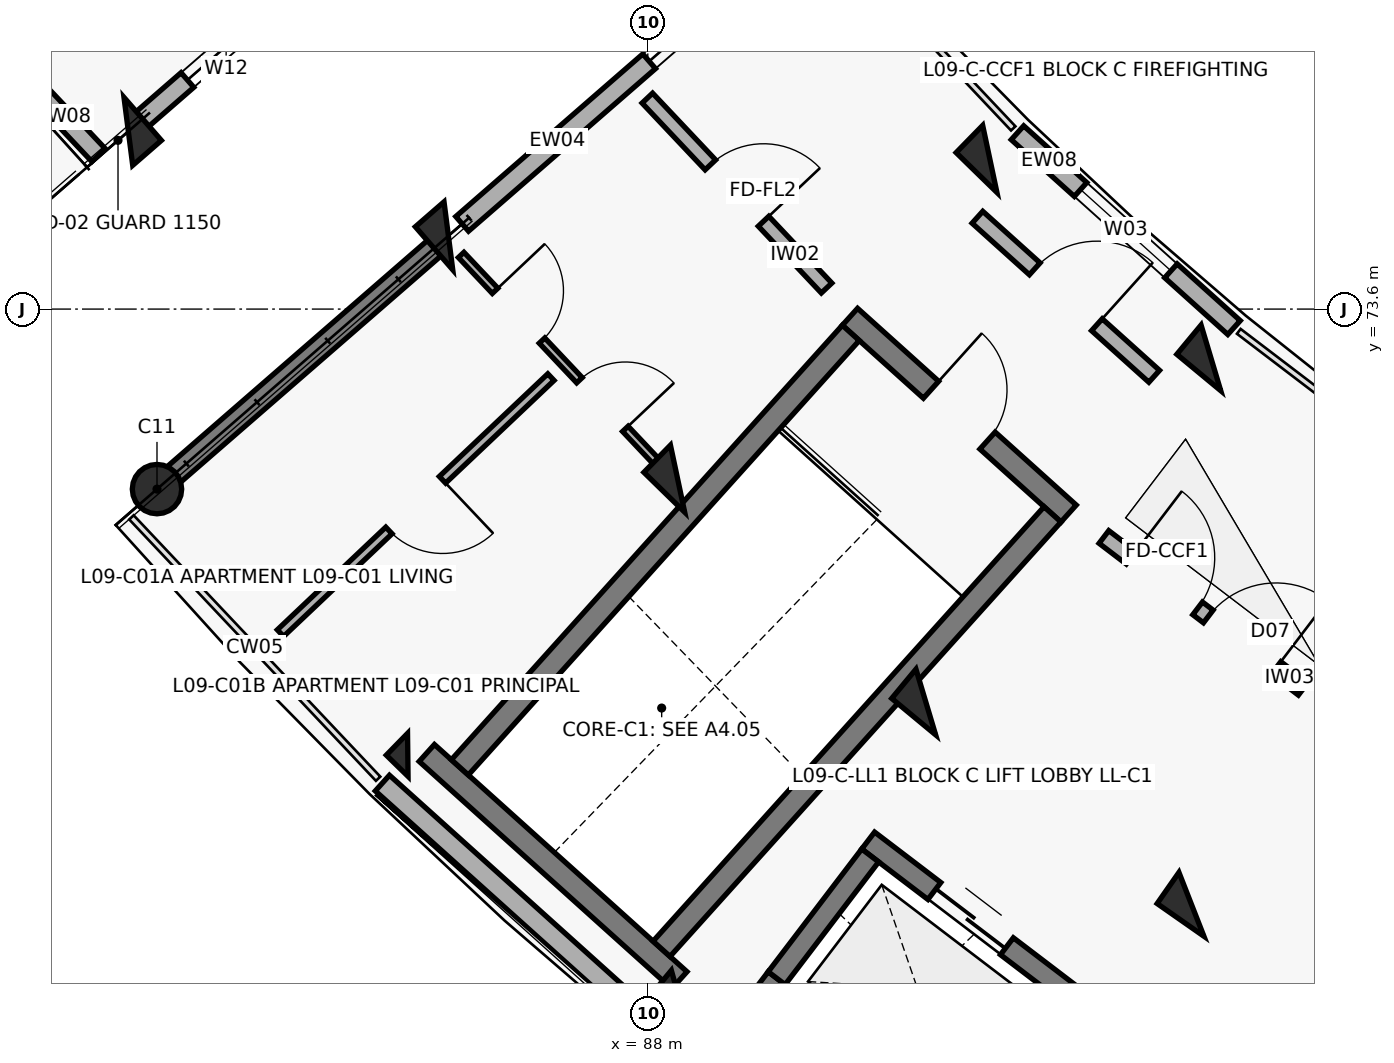
"""IFC4 building model, lengths in metres.
Left out: names, types, materials, properties, quantities, classifications, styles, units other than length and angle.
Written with IfcOpenShell. Run it as: python <this file> out.ifc"""

import sys

from ifc_helpers import new_model, si_unit, direction, frame, frame_2d, origin, origin_2d, place, context, subcontext, project, spatial, rectangle, circle, extrude, element, fill, save


model = new_model("IFC4")
c1 = context("Model", 3, precision=1e-05, world=origin(), true_north=direction((0.0, 1.0)))
c2 = subcontext(c1, "Body", "Model", "MODEL_VIEW")
j1 = project(units=[si_unit("LENGTHUNIT", "METRE"), si_unit("PLANEANGLEUNIT", "RADIAN")], contexts=[c1])
p1 = place(None, origin())
s1 = spatial("IfcSite", under=j1, at=p1, CompositionType="ELEMENT")
p2 = place(p1, origin())
s2 = spatial("IfcBuilding", under=s1, at=p2, CompositionType="ELEMENT")
p3 = place(p2, frame((0.0, 0.0, 29.8)))
s3 = spatial("IfcBuildingStorey", under=s2, at=p3, CompositionType="ELEMENT", Elevation=29.8)
for number, where, z_axis, x_axis in (
    (1, (81.166, 75.938, 0.0), (0.0, 0.0, 1.0), (0.755, 0.656, 0.0)),
    (2, (85.377, 74.564, 0.0), (0.0, 0.0, 1.0), (-0.755, -0.656, 0.0)),
):
    element("IfcColumn", number, at=place(p3, frame(where, z_axis=z_axis, x_axis=x_axis)), inside=s3, PredefinedType="COLUMN", context=c2, shape_type="SweptSolid", body=[
        extrude(rectangle(XDim=0.5, YDim=0.75, at=origin_2d()), origin(), (0.0, 0.0, 1.0), 3.1),
    ])
p4 = place(p3, frame((81.543, 71.231, 0.0), z_axis=(0.0, 0.0, 1.0), x_axis=(-0.754709580223, -0.656059028991, 0.0)))
e3 = element("IfcColumn", 3, at=p4, inside=s3, PredefinedType="COLUMN", context=c2, shape_type="SweptSolid", body=[
    extrude(circle(Radius=0.325, at=origin_2d()), origin(), (0.0, 0.0, 1.0), 3.1),
])
for number, where, z_axis, x_axis in (
    (4, (92.5, 75.576, 0.0), (0.0, 0.0, 1.0), (-0.699, -0.715, 0.0)),
    (5, (88.392, 71.369, 0.0), (0.0, 0.0, 1.0), (-0.699, -0.715, 0.0)),
):
    element("IfcColumn", number, at=place(p3, frame(where, z_axis=z_axis, x_axis=x_axis)), inside=s3, PredefinedType="COLUMN", context=c2, shape_type="SweptSolid", body=[
        extrude(rectangle(XDim=0.5, YDim=0.75, at=origin_2d()), origin(), (0.0, 0.0, 1.0), 3.1),
    ])
p5 = place(p3, frame((84.843, 67.734, 0.0), z_axis=(0.0, 0.0, 1.0), x_axis=(-0.698665066769, -0.715448897181, 0.0)))
e6 = element("IfcColumn", 6, at=p5, inside=s3, PredefinedType="COLUMN", context=c2, shape_type="SweptSolid", body=[
    extrude(rectangle(XDim=0.4, YDim=0.4, at=origin_2d()), origin(), (0.0, 0.0, 1.0), 3.1),
])
for number, where, z_axis, x_axis in (
    (7, (95.409, 72.958, 0.0), (0.0, 0.0, 1.0), (-0.638, -0.77, 0.0)),
    (8, (91.658, 68.43, 0.0), (0.0, 0.0, 1.0), (-0.638, -0.77, 0.0)),
):
    element("IfcColumn", number, at=place(p3, frame(where, z_axis=z_axis, x_axis=x_axis)), inside=s3, PredefinedType="COLUMN", context=c2, shape_type="SweptSolid", body=[
        extrude(rectangle(XDim=0.5, YDim=0.75, at=origin_2d()), origin(), (0.0, 0.0, 1.0), 3.1),
    ])
p6 = place(p3, frame((88.417, 64.518, 0.0), z_axis=(0.0, 0.0, 1.0), x_axis=(-0.637961754089, -0.770068049148, 0.0)))
e9 = element("IfcColumn", 9, at=p6, inside=s3, PredefinedType="COLUMN", context=c2, shape_type="SweptSolid", body=[
    extrude(rectangle(XDim=0.45, YDim=0.65, at=origin_2d()), origin(), (0.0, 0.0, 1.0), 3.1),
])
p7 = place(p3, frame((95.152, 65.768, 0.0), z_axis=(0.0, 0.0, 1.0), x_axis=(-0.573004420611, -0.819552276527, 0.0)))
e10 = element("IfcColumn", 10, at=p7, inside=s3, PredefinedType="COLUMN", context=c2, shape_type="SweptSolid", body=[
    extrude(rectangle(XDim=0.5, YDim=0.75, at=origin_2d()), origin(), (0.0, 0.0, 1.0), 3.1),
])
p8 = place(p3, frame((85.241, 74.446, 0.0), z_axis=(0.0, 0.0, 1.0), x_axis=(-0.754703505217, -0.65606601742, 0.0)))
e11 = element("IfcWall", 11, at=p8, inside=s3, PredefinedType="SHEAR", context=c2, shape_type="SweptSolid", body=[
    extrude(rectangle(XDim=4.72, YDim=0.27, at=frame_2d((2.36, 0.0))), origin(), (0.0, 0.0, 1.0), 2.92),
])
p9 = place(p3, frame((78.145, 78.412, 0.0), z_axis=(0.0, 0.0, 1.0), x_axis=(0.686296103853, -0.727322251712, 0.0)))
e12 = element("IfcWall", 12, at=p9, inside=s3, PredefinedType="SOLIDWALL", context=c2, shape_type="SweptSolid", body=[
    extrude(rectangle(XDim=3.832, YDim=0.245, at=frame_2d((1.916, 0.0))), origin(), (0.0, 0.0, 1.0), 2.25),
])
p10 = place(p9, frame((1.366, 0.0, 0.0)))
e13 = element("IfcOpeningElement", 13, at=p10, cuts=e12, PredefinedType="OPENING", context=c2, shape_type="SweptSolid", body=[
    extrude(rectangle(XDim=1.1, YDim=2.15, at=frame_2d((0.55, 1.075))), frame((0.0, 0.133, 0.0), z_axis=(0.0, -1.0, 0.0), x_axis=(1.0, 0.0, 0.0)), (0.0, 0.0, 1.0), 0.265),
])
p11 = place(p3, frame((81.347, 76.096, 0.0), z_axis=(0.0, 0.0, 1.0), x_axis=(0.754709658894, 0.65605893849, 0.0)))
e14 = element("IfcWall", 14, at=p11, inside=s3, PredefinedType="SOLIDWALL", context=c2, shape_type="SweptSolid", body=[
    extrude(rectangle(XDim=5.4, YDim=0.255, at=frame_2d((2.7, 0.0))), origin(), (0.0, 0.0, 1.0), 2.18),
])
p12 = place(p11, frame((0.79, 0.0, 0.75)))
e15 = element("IfcOpeningElement", 15, at=p12, cuts=e14, PredefinedType="OPENING", context=c2, shape_type="SweptSolid", body=[
    extrude(rectangle(XDim=1.35, YDim=1.35, at=frame_2d((0.675, 0.675))), frame((0.0, 0.137, 0.0), z_axis=(0.0, -1.0, 0.0), x_axis=(1.0, 0.0, 0.0)), (0.0, 0.0, 1.0), 0.275),
])
p13 = place(p3, frame((84.508, 67.363, 0.0), z_axis=(0.0, 0.0, 1.0), x_axis=(0.743387539862, -0.668860946369, 0.0)))
e16 = element("IfcWall", 16, at=p13, inside=s3, PredefinedType="SOLIDWALL", context=c2, shape_type="SweptSolid", body=[
    extrude(rectangle(XDim=4.809, YDim=0.278, at=frame_2d((2.405, 0.0))), origin(), (0.0, 0.0, 1.0), 2.25),
])
p14 = place(p3, frame((92.864, 75.92, 0.0), z_axis=(0.0, 0.0, 1.0), x_axis=(0.743363835609, -0.668887290886, 0.0)))
e17 = element("IfcWall", 17, at=p14, inside=s3, PredefinedType="SOLIDWALL", context=c2, shape_type="SweptSolid", body=[
    extrude(rectangle(XDim=3.832, YDim=0.245, at=frame_2d((1.916, 0.0))), origin(), (0.0, 0.0, 1.0), 2.25),
])
p15 = place(p14, frame((1.116, 0.0, 0.32)))
e18 = element("IfcOpeningElement", 18, at=p15, cuts=e17, PredefinedType="OPENING", context=c2, shape_type="SweptSolid", body=[
    extrude(rectangle(XDim=1.6, YDim=1.5, at=frame_2d((0.8, 0.75))), frame((0.0, 0.133, 0.0), z_axis=(0.0, -1.0, 0.0), x_axis=(1.0, 0.0, 0.0)), (0.0, 0.0, 1.0), 0.265),
])
p16 = place(p3, frame((89.633, 78.264, 0.0), z_axis=(0.0, 0.0, 1.0), x_axis=(-0.754709658894, -0.65605893849, 0.0)))
e19 = element("IfcWall", 19, at=p16, inside=s3, PredefinedType="SOLIDWALL", context=c2, shape_type="SweptSolid", body=[
    extrude(rectangle(XDim=5.4, YDim=0.255, at=frame_2d((2.7, 0.0))), origin(), (0.0, 0.0, 1.0), 2.24),
])
p17 = place(p16, frame((0.79, 0.0, 0.75)))
e20 = element("IfcOpeningElement", 20, at=p17, cuts=e19, PredefinedType="OPENING", context=c2, shape_type="SweptSolid", body=[
    extrude(rectangle(XDim=1.35, YDim=1.35, at=frame_2d((0.675, 0.675))), frame((0.0, 0.137, 0.0), z_axis=(0.0, -1.0, 0.0), x_axis=(1.0, 0.0, 0.0)), (0.0, 0.0, 1.0), 0.275),
])
p18 = place(p3, frame((90.66, 73.499, 0.0), z_axis=(0.0, 0.0, 1.0), x_axis=(0.743375696158, -0.668874109501, 0.0)))
e21 = element("IfcWall", 21, at=p18, inside=s3, PredefinedType="SHEAR", context=c2, shape_type="SweptSolid", body=[
    extrude(rectangle(XDim=3.87, YDim=0.3, at=frame_2d((1.935, 0.0))), origin(), (0.0, 0.0, 1.0), 3.1),
])
p19 = place(p18, frame((1.435, 0.0, 0.0)))
e22 = element("IfcOpeningElement", 22, at=p19, cuts=e21, PredefinedType="OPENING", context=c2, shape_type="SweptSolid", body=[
    extrude(rectangle(XDim=1.0, YDim=2.15, at=frame_2d((0.5, 1.075))), frame((0.0, 0.16, 0.0), z_axis=(0.0, -1.0, 0.0), x_axis=(1.0, 0.0, 0.0)), (0.0, 0.0, 1.0), 0.32),
])
p20 = place(p3, frame((85.093, 67.76, 0.0), z_axis=(0.0, 0.0, 1.0), x_axis=(0.743372896184, -0.668877221333, 0.0)))
e23 = element("IfcWall", 23, at=p20, inside=s3, PredefinedType="SHEAR", context=c2, shape_type="SweptSolid", body=[
    extrude(rectangle(XDim=4.47, YDim=0.3, at=frame_2d((2.235, 0.0))), origin(), (0.0, 0.0, 1.0), 3.1),
])
p21 = place(p3, frame((90.671, 73.287, 0.0), z_axis=(0.0, 0.0, 1.0), x_axis=(-0.668885797871, -0.743365179038, 0.0)))
e24 = element("IfcWall", 24, at=p21, inside=s3, PredefinedType="SHEAR", context=c2, shape_type="SweptSolid", body=[
    extrude(rectangle(XDim=7.69, YDim=0.3, at=frame_2d((3.845, 0.0))), origin(), (0.0, 0.0, 1.0), 3.1),
])
p22 = place(p3, frame((93.325, 70.899, 0.0), z_axis=(0.0, 0.0, 1.0), x_axis=(-0.668868253964, -0.743380964808, 0.0)))
e25 = element("IfcWall", 25, at=p22, inside=s3, PredefinedType="SHEAR", context=c2, shape_type="SweptSolid", body=[
    extrude(rectangle(XDim=7.69, YDim=0.3, at=frame_2d((3.845, 0.0))), origin(), (0.0, 0.0, 1.0), 3.1),
])
p23 = place(p3, frame((90.899, 66.607, 0.0), z_axis=(0.0, 0.0, 1.0), x_axis=(0.795439986025, -0.606032365994, 0.0)))
e26 = element("IfcWall", 26, at=p23, inside=s3, PredefinedType="SHEAR", context=c2, shape_type="SweptSolid", body=[
    extrude(rectangle(XDim=3.39, YDim=0.28, at=frame_2d((1.695, 0.0))), origin(), (0.0, 0.0, 1.0), 3.1),
])
p24 = place(p23, frame((1.095, 0.0, 0.0)))
e27 = element("IfcOpeningElement", 27, at=p24, cuts=e26, PredefinedType="OPENING", context=c2, shape_type="SweptSolid", body=[
    extrude(rectangle(XDim=1.2, YDim=2.15, at=frame_2d((0.6, 1.075))), frame((0.0, 0.15, 0.0), z_axis=(0.0, -1.0, 0.0), x_axis=(1.0, 0.0, 0.0)), (0.0, 0.0, 1.0), 0.3),
])
p25 = place(p3, frame((89.5, 64.77, 0.0), z_axis=(0.0, 0.0, 1.0), x_axis=(0.795474703455, -0.605986795371, 0.0)))
e28 = element("IfcWall", 28, at=p25, inside=s3, PredefinedType="SHEAR", context=c2, shape_type="SweptSolid", body=[
    extrude(rectangle(XDim=3.39, YDim=0.28, at=frame_2d((1.695, 0.0))), origin(), (0.0, 0.0, 1.0), 3.1),
])
p26 = place(p3, frame((90.926, 66.411, 0.0), z_axis=(0.0, 0.0, 1.0), x_axis=(-0.605948992168, -0.795503500238, 0.0)))
e29 = element("IfcWall", 29, at=p26, inside=s3, PredefinedType="SHEAR", context=c2, shape_type="SweptSolid", body=[
    extrude(rectangle(XDim=2.03, YDim=0.28, at=frame_2d((1.015, 0.0))), origin(), (0.0, 0.0, 1.0), 3.1),
])
p27 = place(p3, frame((87.994, 76.376, 0.0), z_axis=(0.0, 0.0, 1.0), x_axis=(0.686310507227, -0.727308660522, 0.0)))
e30 = element("IfcWall", 30, at=p27, inside=s3, PredefinedType="SOLIDWALL", context=c2, shape_type="SweptSolid", body=[
    extrude(rectangle(XDim=3.436, YDim=0.19, at=frame_2d((1.718, 0.0))), origin(), (0.0, 0.0, 1.0), 2.14),
])
p28 = place(p27, frame((1.208, 0.0, 0.0)))
e31 = element("IfcOpeningElement", 31, at=p28, cuts=e30, PredefinedType="OPENING", context=c2, shape_type="SweptSolid", body=[
    extrude(rectangle(XDim=1.02, YDim=2.15, at=frame_2d((0.51, 1.075))), frame((0.0, 0.105, 0.0), z_axis=(0.0, -1.0, 0.0), x_axis=(1.0, 0.0, 0.0)), (0.0, 0.0, 1.0), 0.21),
])
p29 = place(p3, frame((85.545, 74.313, 0.0), z_axis=(0.0, 0.0, 1.0), x_axis=(0.686332741542, -0.727287678906, 0.0)))
e32 = element("IfcWall", 32, at=p29, inside=s3, PredefinedType="PARTITIONING", context=c2, shape_type="SweptSolid", body=[
    extrude(rectangle(XDim=3.797, YDim=0.1, at=frame_2d((1.899, 0.0))), origin(), (0.0, 0.0, 1.0), 2.14),
])
p30 = place(p29, frame((0.65, 0.0, 0.0)))
e33 = element("IfcOpeningElement", 33, at=p30, cuts=e32, PredefinedType="OPENING", context=c2, shape_type="SweptSolid", body=[
    extrude(rectangle(XDim=0.9, YDim=2.1, at=frame_2d((0.45, 1.05))), frame((0.0, 0.06, 0.0), z_axis=(0.0, -1.0, 0.0), x_axis=(1.0, 0.0, 0.0)), (0.0, 0.0, 1.0), 0.12),
])
p31 = place(p29, frame((2.267, 0.0, 0.0)))
e34 = element("IfcOpeningElement", 34, at=p31, cuts=e32, PredefinedType="OPENING", context=c2, shape_type="SweptSolid", body=[
    extrude(rectangle(XDim=0.88, YDim=2.1, at=frame_2d((0.44, 1.05))), frame((0.0, 0.06, 0.0), z_axis=(0.0, -1.0, 0.0), x_axis=(1.0, 0.0, 0.0)), (0.0, 0.0, 1.0), 0.12),
])
p32 = place(p3, frame((86.726, 72.705, 0.0), z_axis=(0.0, 0.0, 1.0), x_axis=(-0.726270746475, -0.687408759629, 0.0)))
e35 = element("IfcWall", 35, at=p32, inside=s3, PredefinedType="PARTITIONING", context=c2, shape_type="SweptSolid", body=[
    extrude(rectangle(XDim=4.9, YDim=0.12, at=frame_2d((2.45, 0.0))), origin(), (0.0, 0.0, 1.0), 2.14),
])
p33 = place(p32, frame((1.965, 0.0, 0.0)))
e36 = element("IfcOpeningElement", 36, at=p33, cuts=e35, PredefinedType="OPENING", context=c2, shape_type="SweptSolid", body=[
    extrude(rectangle(XDim=0.97, YDim=2.1, at=frame_2d((0.485, 1.05))), frame((0.0, 0.07, 0.0), z_axis=(0.0, -1.0, 0.0), x_axis=(1.0, 0.0, 0.0)), (0.0, 0.0, 1.0), 0.14),
])
p34 = place(p3, frame((92.337, 74.808, 0.0), z_axis=(0.0, 0.0, 1.0), x_axis=(0.743348465558, -0.668904371904, 0.0)))
e37 = element("IfcWall", 37, at=p34, inside=s3, PredefinedType="SOLIDWALL", context=c2, shape_type="SweptSolid", body=[
    extrude(rectangle(XDim=3.129, YDim=0.21, at=frame_2d((1.564, 0.0))), origin(), (0.0, 0.0, 1.0), 2.14),
])
p35 = place(p34, frame((1.014, 0.0, 0.0)))
e38 = element("IfcOpeningElement", 38, at=p35, cuts=e37, PredefinedType="OPENING", context=c2, shape_type="SweptSolid", body=[
    extrude(rectangle(XDim=1.1, YDim=2.15, at=frame_2d((0.55, 1.075))), frame((0.0, 0.115, 0.0), z_axis=(0.0, -1.0, 0.0), x_axis=(1.0, 0.0, 0.0)), (0.0, 0.0, 1.0), 0.23),
])
p36 = place(p3, frame((94.001, 70.602, 0.0), z_axis=(0.0, 0.0, 1.0), x_axis=(0.795498026433, -0.605956178235, 0.0)))
e39 = element("IfcWall", 39, at=p36, inside=s3, PredefinedType="SOLIDWALL", context=c2, shape_type="SweptSolid", body=[
    extrude(rectangle(XDim=3.296, YDim=0.21, at=frame_2d((1.648, 0.0))), origin(), (0.0, 0.0, 1.0), 2.14),
])
p37 = place(p36, frame((0.45, 0.0, 0.0)))
e40 = element("IfcOpeningElement", 40, at=p37, cuts=e39, PredefinedType="OPENING", context=c2, shape_type="SweptSolid", body=[
    extrude(rectangle(XDim=1.1, YDim=2.15, at=frame_2d((0.55, 1.075))), frame((0.0, 0.115, 0.0), z_axis=(0.0, -1.0, 0.0), x_axis=(1.0, 0.0, 0.0)), (0.0, 0.0, 1.0), 0.23),
])
p38 = place(p36, frame((1.726, 0.0, 0.0)))
e41 = element("IfcOpeningElement", 41, at=p38, cuts=e39, PredefinedType="OPENING", context=c2, shape_type="SweptSolid", body=[
    extrude(rectangle(XDim=1.12, YDim=2.15, at=frame_2d((0.56, 1.075))), frame((0.0, 0.115, 0.0), z_axis=(0.0, -1.0, 0.0), x_axis=(1.0, 0.0, 0.0)), (0.0, 0.0, 1.0), 0.23),
])
p39 = place(p3, frame((98.504, 67.072, 0.0), z_axis=(0.0, 0.0, 1.0), x_axis=(-0.540338452216, -0.841447774408, 0.0)))
e42 = element("IfcWall", 42, at=p39, inside=s3, PredefinedType="PARTITIONING", context=c2, shape_type="SweptSolid", body=[
    extrude(rectangle(XDim=7.95, YDim=0.14, at=frame_2d((3.975, 0.0))), origin(), (0.0, 0.0, 1.0), 2.14),
])
p40 = place(p39, frame((6.05, 0.0, 0.0)))
e43 = element("IfcOpeningElement", 43, at=p40, cuts=e42, PredefinedType="OPENING", context=c2, shape_type="SweptSolid", body=[
    extrude(rectangle(XDim=0.92, YDim=2.1, at=frame_2d((0.46, 1.05))), frame((0.0, 0.08, 0.0), z_axis=(0.0, -1.0, 0.0), x_axis=(1.0, 0.0, 0.0)), (0.0, 0.0, 1.0), 0.16),
])
p41 = place(p12, origin())
e44 = element("IfcWindow", 44, at=p41, inside=s3, PartitioningType="DOUBLE_PANEL_VERTICAL", PredefinedType="WINDOW", context=c2, shape_type="SweptSolid", body=[
    extrude(rectangle(XDim=1.35, YDim=1.35, at=frame_2d((0.675, 0.675))), frame((0.0, 0.03, 0.0), z_axis=(0.0, -1.0, 0.0), x_axis=(1.0, 0.0, 0.0)), (0.0, 0.0, 1.0), 0.06),
])
fill(e15, e44)
p42 = place(p15, origin())
e45 = element("IfcWindow", 45, at=p42, inside=s3, PartitioningType="DOUBLE_PANEL_VERTICAL", PredefinedType="WINDOW", context=c2, shape_type="SweptSolid", body=[
    extrude(rectangle(XDim=1.6, YDim=1.5, at=frame_2d((0.8, 0.75))), frame((0.0, 0.03, 0.0), z_axis=(0.0, -1.0, 0.0), x_axis=(1.0, 0.0, 0.0)), (0.0, 0.0, 1.0), 0.06),
])
fill(e18, e45)
p43 = place(p17, origin())
e46 = element("IfcWindow", 46, at=p43, inside=s3, PartitioningType="DOUBLE_PANEL_VERTICAL", PredefinedType="WINDOW", context=c2, shape_type="SweptSolid", body=[
    extrude(rectangle(XDim=1.35, YDim=1.35, at=frame_2d((0.675, 0.675))), frame((0.0, 0.03, 0.0), z_axis=(0.0, -1.0, 0.0), x_axis=(1.0, 0.0, 0.0)), (0.0, 0.0, 1.0), 0.06),
])
fill(e20, e46)
p44 = place(p19, origin())
e47 = element("IfcDoor", 47, at=p44, inside=s3, OperationType="SINGLE_SWING_LEFT", PredefinedType="DOOR", context=c2, shape_type="SweptSolid", body=[
    extrude(rectangle(XDim=1.0, YDim=2.15, at=frame_2d((0.5, 1.075))), frame((0.0, 0.025, 0.0), z_axis=(0.0, -1.0, 0.0), x_axis=(1.0, 0.0, 0.0)), (0.0, 0.0, 1.0), 0.05),
])
fill(e22, e47)
p45 = place(p24, origin())
e48 = element("IfcDoor", 48, at=p45, inside=s3, OperationType="DOUBLE_DOOR_SLIDING", PredefinedType="DOOR", context=c2, shape_type="SweptSolid", body=[
    extrude(rectangle(XDim=1.2, YDim=2.15, at=frame_2d((0.6, 1.075))), frame((0.0, 0.025, 0.0), z_axis=(0.0, -1.0, 0.0), x_axis=(1.0, 0.0, 0.0)), (0.0, 0.0, 1.0), 0.05),
])
fill(e27, e48)
p46 = place(p28, origin())
e49 = element("IfcDoor", 49, at=p46, inside=s3, OperationType="SINGLE_SWING_RIGHT", PredefinedType="DOOR", context=c2, shape_type="SweptSolid", body=[
    extrude(rectangle(XDim=1.02, YDim=2.15, at=frame_2d((0.51, 1.075))), frame((0.0, 0.025, 0.0), z_axis=(0.0, -1.0, 0.0), x_axis=(1.0, 0.0, 0.0)), (0.0, 0.0, 1.0), 0.05),
])
fill(e31, e49)
p47 = place(p30, origin())
e50 = element("IfcDoor", 50, at=p47, inside=s3, OperationType="SINGLE_SWING_LEFT", PredefinedType="DOOR", context=c2, shape_type="SweptSolid", body=[
    extrude(rectangle(XDim=0.9, YDim=2.1, at=frame_2d((0.45, 1.05))), frame((0.0, 0.025, 0.0), z_axis=(0.0, -1.0, 0.0), x_axis=(1.0, 0.0, 0.0)), (0.0, 0.0, 1.0), 0.05),
])
fill(e33, e50)
p48 = place(p31, origin())
e51 = element("IfcDoor", 51, at=p48, inside=s3, OperationType="SINGLE_SWING_RIGHT", PredefinedType="DOOR", context=c2, shape_type="SweptSolid", body=[
    extrude(rectangle(XDim=0.88, YDim=2.1, at=frame_2d((0.44, 1.05))), frame((0.0, 0.025, 0.0), z_axis=(0.0, -1.0, 0.0), x_axis=(1.0, 0.0, 0.0)), (0.0, 0.0, 1.0), 0.05),
])
fill(e34, e51)
p49 = place(p33, origin())
e52 = element("IfcDoor", 52, at=p49, inside=s3, OperationType="SINGLE_SWING_LEFT", PredefinedType="DOOR", context=c2, shape_type="SweptSolid", body=[
    extrude(rectangle(XDim=0.97, YDim=2.1, at=frame_2d((0.485, 1.05))), frame((0.0, 0.025, 0.0), z_axis=(0.0, -1.0, 0.0), x_axis=(1.0, 0.0, 0.0)), (0.0, 0.0, 1.0), 0.05),
])
fill(e36, e52)
p50 = place(p35, origin())
e53 = element("IfcDoor", 53, at=p50, inside=s3, OperationType="SINGLE_SWING_RIGHT", PredefinedType="DOOR", context=c2, shape_type="SweptSolid", body=[
    extrude(rectangle(XDim=1.1, YDim=2.15, at=frame_2d((0.55, 1.075))), frame((0.0, 0.025, 0.0), z_axis=(0.0, -1.0, 0.0), x_axis=(1.0, 0.0, 0.0)), (0.0, 0.0, 1.0), 0.05),
])
fill(e38, e53)
p51 = place(p37, origin())
e54 = element("IfcDoor", 54, at=p51, inside=s3, OperationType="SINGLE_SWING_LEFT", PredefinedType="DOOR", context=c2, shape_type="SweptSolid", body=[
    extrude(rectangle(XDim=1.1, YDim=2.15, at=frame_2d((0.55, 1.075))), frame((0.0, 0.025, 0.0), z_axis=(0.0, -1.0, 0.0), x_axis=(1.0, 0.0, 0.0)), (0.0, 0.0, 1.0), 0.05),
])
fill(e40, e54)
p52 = place(p38, origin())
e55 = element("IfcDoor", 55, at=p52, inside=s3, OperationType="SINGLE_SWING_RIGHT", PredefinedType="DOOR", context=c2, shape_type="SweptSolid", body=[
    extrude(rectangle(XDim=1.12, YDim=2.15, at=frame_2d((0.56, 1.075))), frame((0.0, 0.025, 0.0), z_axis=(0.0, -1.0, 0.0), x_axis=(1.0, 0.0, 0.0)), (0.0, 0.0, 1.0), 0.05),
])
fill(e41, e55)
save(model, sys.argv[1])
